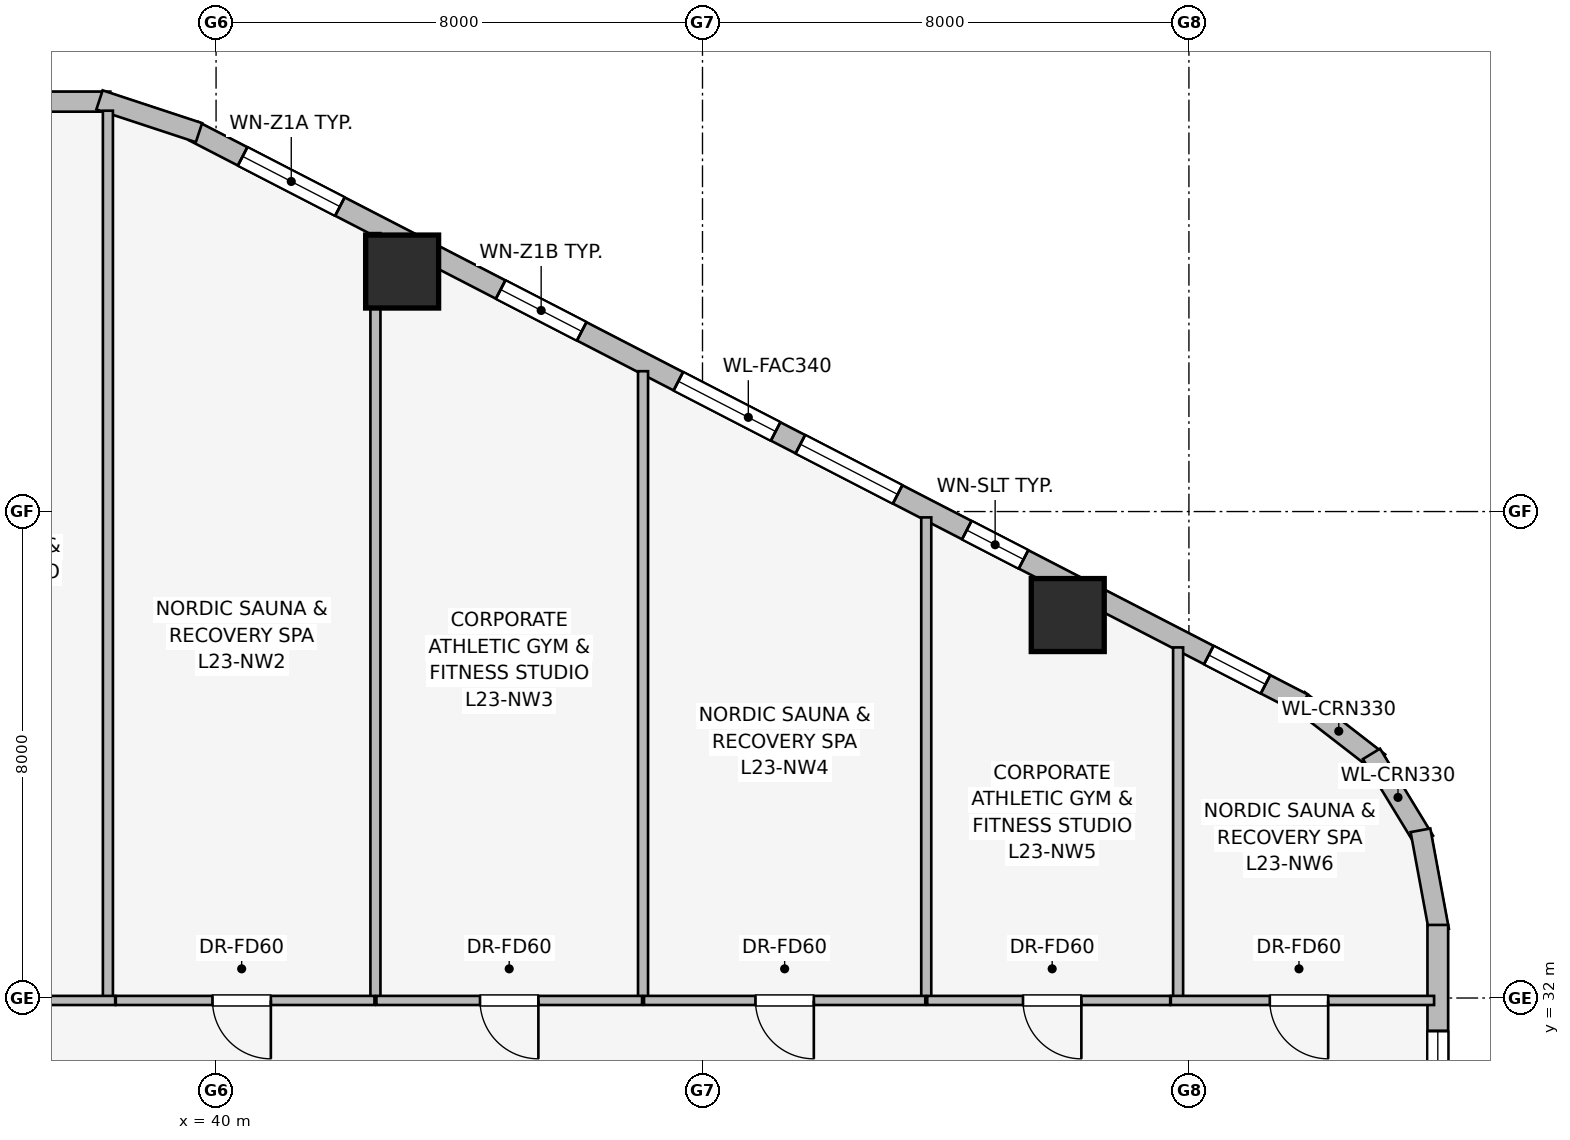
"""IFC4 building model, lengths in metres.
Left out: names, types, materials, properties, quantities, classifications, styles, units other than length and angle.
Written with IfcOpenShell. Run it as: python <this file> out.ifc"""

import sys

from ifc_helpers import new_model, si_unit, direction, frame, frame_2d, origin, origin_2d, place, context, subcontext, project, spatial, rectangle, extrude, element, fill, save


model = new_model("IFC4")
c1 = context("Model", 3, precision=1e-05, world=origin(), true_north=direction((0.0, 1.0)))
c2 = subcontext(c1, "Body", "Model", "MODEL_VIEW")
j1 = project(units=[si_unit("LENGTHUNIT", "METRE"), si_unit("PLANEANGLEUNIT", "RADIAN")], contexts=[c1])
p1 = place(None, origin())
s1 = spatial("IfcSite", under=j1, at=p1, CompositionType="ELEMENT")
p2 = place(p1, origin())
s2 = spatial("IfcBuilding", under=s1, at=p2, CompositionType="ELEMENT")
p3 = place(p2, frame((0.0, 0.0, 89.05)))
s3 = spatial("IfcBuildingStorey", under=s2, at=p3, CompositionType="ELEMENT", Elevation=89.05)
for number, where, z_axis, x_axis in (
    (1, (54.007, 38.298, 0.0), (0.0, 0.0, 1.0), (1.0, 0.0, 0.0)),
    (2, (43.06, 43.947, 0.0), (0.0, 0.0, 1.0), (1.0, 0.0, 0.0)),
):
    element("IfcColumn", number, at=place(p3, frame(where, z_axis=z_axis, x_axis=x_axis)), inside=s3, PredefinedType="COLUMN", context=c2, shape_type="SweptSolid", body=[
        extrude(rectangle(XDim=1.2, YDim=1.2, at=origin_2d()), origin(), (0.0, 0.0, 1.0), 3.65),
    ])
p4 = place(p3, frame((57.802, 36.901, 0.0), z_axis=(0.0, 0.0, 1.0), x_axis=(0.790691856293, -0.61221433207, 0.0)))
e3 = element("IfcWall", 3, at=p4, inside=s3, PredefinedType="STANDARD", context=c2, shape_type="SweptSolid", body=[
    extrude(rectangle(XDim=1.676, YDim=0.33, at=frame_2d((0.838, 0.0))), origin(), (0.0, 0.0, 1.0), 3.39),
])
p5 = place(p3, frame((59.002, 36.015, 0.0), z_axis=(0.0, 0.0, 1.0), x_axis=(0.520584129191, -0.853810379671, 0.0)))
e4 = element("IfcWall", 4, at=p5, inside=s3, PredefinedType="STANDARD", context=c2, shape_type="SweptSolid", body=[
    extrude(rectangle(XDim=1.677, YDim=0.33, at=frame_2d((0.838, 0.0))), origin(), (0.0, 0.0, 1.0), 3.39),
])
p6 = place(p3, frame((59.808, 34.758, 0.0), z_axis=(0.0, 0.0, 1.0), x_axis=(0.181714143354, -0.983351397063, 0.0)))
e5 = element("IfcWall", 5, at=p6, inside=s3, PredefinedType="STANDARD", context=c2, shape_type="SweptSolid", body=[
    extrude(rectangle(XDim=1.678, YDim=0.33, at=frame_2d((0.839, 0.0))), origin(), (0.0, 0.0, 1.0), 3.39),
])
p7 = place(p3, frame((39.631, 46.257, 0.0), z_axis=(0.0, 0.0, 1.0), x_axis=(0.888634413993, -0.458616264721, 0.0)))
e6 = element("IfcWall", 6, at=p7, inside=s3, PredefinedType="STANDARD", context=c2, shape_type="SweptSolid", body=[
    extrude(rectangle(XDim=20.531, YDim=0.34, at=frame_2d((10.266, 0.0))), origin(), (0.0, 0.0, 1.0), 2.684),
])
p8 = place(p7, frame((0.907, 0.0, 0.75)))
e7 = element("IfcOpeningElement", 7, at=p8, cuts=e6, PredefinedType="OPENING", context=c2, shape_type="SweptSolid", body=[
    extrude(rectangle(XDim=1.8, YDim=1.5, at=frame_2d((0.9, 0.75))), frame((0.0, 0.18, 0.0), z_axis=(0.0, -1.0, 0.0), x_axis=(1.0, 0.0, 0.0)), (0.0, 0.0, 1.0), 0.36),
])
p9 = place(p7, frame((5.682, 0.0, 0.75)))
e8 = element("IfcOpeningElement", 8, at=p9, cuts=e6, PredefinedType="OPENING", context=c2, shape_type="SweptSolid", body=[
    extrude(rectangle(XDim=1.5, YDim=1.5, at=frame_2d((0.75, 0.75))), frame((0.0, 0.18, 0.0), z_axis=(0.0, -1.0, 0.0), x_axis=(1.0, 0.0, 0.0)), (0.0, 0.0, 1.0), 0.36),
])
p10 = place(p7, frame((8.971, 0.0, 0.75)))
e9 = element("IfcOpeningElement", 9, at=p10, cuts=e6, PredefinedType="OPENING", context=c2, shape_type="SweptSolid", body=[
    extrude(rectangle(XDim=1.8, YDim=1.5, at=frame_2d((0.9, 0.75))), frame((0.0, 0.18, 0.0), z_axis=(0.0, -1.0, 0.0), x_axis=(1.0, 0.0, 0.0)), (0.0, 0.0, 1.0), 0.36),
])
p11 = place(p7, frame((11.229, 0.0, 0.75)))
e10 = element("IfcOpeningElement", 10, at=p11, cuts=e6, PredefinedType="OPENING", context=c2, shape_type="SweptSolid", body=[
    extrude(rectangle(XDim=1.8, YDim=1.5, at=frame_2d((0.9, 0.75))), frame((0.0, 0.18, 0.0), z_axis=(0.0, -1.0, 0.0), x_axis=(1.0, 0.0, 0.0)), (0.0, 0.0, 1.0), 0.36),
])
p12 = place(p7, frame((14.309, 0.0, 0.75)))
e11 = element("IfcOpeningElement", 11, at=p12, cuts=e6, PredefinedType="OPENING", context=c2, shape_type="SweptSolid", body=[
    extrude(rectangle(XDim=1.05, YDim=1.4, at=frame_2d((0.525, 0.7))), frame((0.0, 0.18, 0.0), z_axis=(0.0, -1.0, 0.0), x_axis=(1.0, 0.0, 0.0)), (0.0, 0.0, 1.0), 0.36),
])
p13 = place(p7, frame((18.788, 0.0, 0.75)))
e12 = element("IfcOpeningElement", 12, at=p13, cuts=e6, PredefinedType="OPENING", context=c2, shape_type="SweptSolid", body=[
    extrude(rectangle(XDim=1.05, YDim=1.4, at=frame_2d((0.525, 0.7))), frame((0.0, 0.18, 0.0), z_axis=(0.0, -1.0, 0.0), x_axis=(1.0, 0.0, 0.0)), (0.0, 0.0, 1.0), 0.36),
])
p14 = place(p3, frame((36.539, 46.741, 0.0), z_axis=(0.0, 0.0, 1.0), x_axis=(1.0, 0.0, 0.0)))
e13 = element("IfcWall", 13, at=p14, inside=s3, PredefinedType="STANDARD", context=c2, shape_type="SweptSolid", body=[
    extrude(rectangle(XDim=1.722, YDim=0.33, at=frame_2d((0.861, 0.0))), origin(), (0.0, 0.0, 1.0), 3.39),
])
p15 = place(p3, frame((38.083, 46.77, 0.0), z_axis=(0.0, 0.0, 1.0), x_axis=(0.94976901097, -0.312951794691, 0.0)))
e14 = element("IfcWall", 14, at=p15, inside=s3, PredefinedType="STANDARD", context=c2, shape_type="SweptSolid", body=[
    extrude(rectangle(XDim=1.722, YDim=0.33, at=frame_2d((0.861, 0.0))), origin(), (0.0, 0.0, 1.0), 3.39),
])
p16 = place(p3, frame((60.093, 33.202, 0.0), z_axis=(0.0, 0.0, 1.0), x_axis=(0.0, -1.0, 0.0)))
e15 = element("IfcWall", 15, at=p16, inside=s3, PredefinedType="STANDARD", context=c2, shape_type="SweptSolid", body=[
    extrude(rectangle(XDim=18.404, YDim=0.34, at=frame_2d((9.202, 0.0))), origin(), (0.0, 0.0, 1.0), 2.684),
])
p17 = place(p16, frame((1.744, 0.0, 0.75)))
e16 = element("IfcOpeningElement", 16, at=p17, cuts=e15, PredefinedType="OPENING", context=c2, shape_type="SweptSolid", body=[
    extrude(rectangle(XDim=1.05, YDim=1.4, at=frame_2d((0.525, 0.7))), frame((0.0, 0.18, 0.0), z_axis=(0.0, -1.0, 0.0), x_axis=(1.0, 0.0, 0.0)), (0.0, 0.0, 1.0), 0.36),
])
p18 = place(p16, frame((5.265, 0.0, 0.75)))
e17 = element("IfcOpeningElement", 17, at=p18, cuts=e15, PredefinedType="OPENING", context=c2, shape_type="SweptSolid", body=[
    extrude(rectangle(XDim=1.5, YDim=1.5, at=frame_2d((0.75, 0.75))), frame((0.0, 0.18, 0.0), z_axis=(0.0, -1.0, 0.0), x_axis=(1.0, 0.0, 0.0)), (0.0, 0.0, 1.0), 0.36),
])
p19 = place(p16, frame((8.452, 0.0, 0.75)))
e18 = element("IfcOpeningElement", 18, at=p19, cuts=e15, PredefinedType="OPENING", context=c2, shape_type="SweptSolid", body=[
    extrude(rectangle(XDim=1.5, YDim=1.5, at=frame_2d((0.75, 0.75))), frame((0.0, 0.18, 0.0), z_axis=(0.0, -1.0, 0.0), x_axis=(1.0, 0.0, 0.0)), (0.0, 0.0, 1.0), 0.36),
])
p20 = place(p16, frame((11.639, 0.0, 0.75)))
e19 = element("IfcOpeningElement", 19, at=p20, cuts=e15, PredefinedType="OPENING", context=c2, shape_type="SweptSolid", body=[
    extrude(rectangle(XDim=1.5, YDim=1.5, at=frame_2d((0.75, 0.75))), frame((0.0, 0.18, 0.0), z_axis=(0.0, -1.0, 0.0), x_axis=(1.0, 0.0, 0.0)), (0.0, 0.0, 1.0), 0.36),
])
p21 = place(p16, frame((15.65, 0.0, 0.75)))
e20 = element("IfcOpeningElement", 20, at=p21, cuts=e15, PredefinedType="OPENING", context=c2, shape_type="SweptSolid", body=[
    extrude(rectangle(XDim=1.05, YDim=1.4, at=frame_2d((0.525, 0.7))), frame((0.0, 0.18, 0.0), z_axis=(0.0, -1.0, 0.0), x_axis=(1.0, 0.0, 0.0)), (0.0, 0.0, 1.0), 0.36),
])
p22 = place(p3, frame((38.221, 31.97, 0.0), z_axis=(0.0, 0.0, 1.0), x_axis=(0.0, 1.0, 0.0)))
e21 = element("IfcWall", 21, at=p22, inside=s3, PredefinedType="PARTITIONING", context=c2, shape_type="SweptSolid", body=[
    extrude(rectangle(XDim=14.622, YDim=0.165, at=frame_2d((7.311, 0.0))), origin(), (0.0, 0.0, 1.0), 3.39),
])
p23 = place(p3, frame((42.621, 31.97, 0.0), z_axis=(0.0, 0.0, 1.0), x_axis=(0.0, 1.0, 0.0)))
e22 = element("IfcWall", 22, at=p23, inside=s3, PredefinedType="PARTITIONING", context=c2, shape_type="SweptSolid", body=[
    extrude(rectangle(XDim=12.609, YDim=0.165, at=frame_2d((6.305, 0.0))), origin(), (0.0, 0.0, 1.0), 2.513),
])
p24 = place(p3, frame((47.022, 31.97, 0.0), z_axis=(0.0, 0.0, 1.0), x_axis=(0.0, 1.0, 0.0)))
e23 = element("IfcWall", 23, at=p24, inside=s3, PredefinedType="PARTITIONING", context=c2, shape_type="SweptSolid", body=[
    extrude(rectangle(XDim=10.338, YDim=0.165, at=frame_2d((5.169, 0.0))), origin(), (0.0, 0.0, 1.0), 3.39),
])
p25 = place(p3, frame((51.68, 31.97, 0.0), z_axis=(0.0, 0.0, 1.0), x_axis=(0.0, 1.0, 0.0)))
e24 = element("IfcWall", 24, at=p25, inside=s3, PredefinedType="PARTITIONING", context=c2, shape_type="SweptSolid", body=[
    extrude(rectangle(XDim=7.934, YDim=0.165, at=frame_2d((3.967, 0.0))), origin(), (0.0, 0.0, 1.0), 3.39),
])
p26 = place(p3, frame((55.822, 31.97, 0.0), z_axis=(0.0, 0.0, 1.0), x_axis=(0.0, 1.0, 0.0)))
e25 = element("IfcWall", 25, at=p26, inside=s3, PredefinedType="PARTITIONING", context=c2, shape_type="SweptSolid", body=[
    extrude(rectangle(XDim=5.796, YDim=0.165, at=frame_2d((2.898, 0.0))), origin(), (0.0, 0.0, 1.0), 3.39),
])
p27 = place(p3, frame((38.341, 31.96, 0.0), z_axis=(0.0, 0.0, 1.0), x_axis=(-1.0, 0.0, 0.0)))
e26 = element("IfcWall", 26, at=p27, inside=s3, PredefinedType="PARTITIONING", context=c2, shape_type="SweptSolid", body=[
    extrude(rectangle(XDim=4.051, YDim=0.15, at=frame_2d((2.025, 0.0))), origin(), (0.0, 0.0, 1.0), 3.39),
])
p28 = place(p27, frame((1.489, 0.0, 0.0)))
e27 = element("IfcOpeningElement", 27, at=p28, cuts=e26, PredefinedType="OPENING", context=c2, shape_type="SweptSolid", body=[
    extrude(rectangle(XDim=0.96, YDim=2.0, at=frame_2d((0.48, 1.0))), frame((0.0, 0.085, 0.0), z_axis=(0.0, -1.0, 0.0), x_axis=(1.0, 0.0, 0.0)), (0.0, 0.0, 1.0), 0.17),
])
p29 = place(p3, frame((42.605, 31.96, 0.0), z_axis=(0.0, 0.0, 1.0), x_axis=(-1.0, 0.0, 0.0)))
e28 = element("IfcWall", 28, at=p29, inside=s3, PredefinedType="PARTITIONING", context=c2, shape_type="SweptSolid", body=[
    extrude(rectangle(XDim=4.254, YDim=0.15, at=frame_2d((2.127, 0.0))), origin(), (0.0, 0.0, 1.0), 3.39),
])
p30 = place(p29, frame((1.704, 0.0, 0.0)))
e29 = element("IfcOpeningElement", 29, at=p30, cuts=e28, PredefinedType="OPENING", context=c2, shape_type="SweptSolid", body=[
    extrude(rectangle(XDim=0.96, YDim=2.0, at=frame_2d((0.48, 1.0))), frame((0.0, 0.085, 0.0), z_axis=(0.0, -1.0, 0.0), x_axis=(1.0, 0.0, 0.0)), (0.0, 0.0, 1.0), 0.17),
])
p31 = place(p3, frame((47.006, 31.96, 0.0), z_axis=(0.0, 0.0, 1.0), x_axis=(-1.0, 0.0, 0.0)))
e30 = element("IfcWall", 30, at=p31, inside=s3, PredefinedType="PARTITIONING", context=c2, shape_type="SweptSolid", body=[
    extrude(rectangle(XDim=4.369, YDim=0.15, at=frame_2d((2.185, 0.0))), origin(), (0.0, 0.0, 1.0), 3.39),
])
p32 = place(p31, frame((1.705, 0.0, 0.0)))
e31 = element("IfcOpeningElement", 31, at=p32, cuts=e30, PredefinedType="OPENING", context=c2, shape_type="SweptSolid", body=[
    extrude(rectangle(XDim=0.96, YDim=2.0, at=frame_2d((0.48, 1.0))), frame((0.0, 0.085, 0.0), z_axis=(0.0, -1.0, 0.0), x_axis=(1.0, 0.0, 0.0)), (0.0, 0.0, 1.0), 0.17),
])
p33 = place(p3, frame((51.664, 31.96, 0.0), z_axis=(0.0, 0.0, 1.0), x_axis=(-1.0, 0.0, 0.0)))
e32 = element("IfcWall", 32, at=p33, inside=s3, PredefinedType="PARTITIONING", context=c2, shape_type="SweptSolid", body=[
    extrude(rectangle(XDim=4.626, YDim=0.15, at=frame_2d((2.313, 0.0))), origin(), (0.0, 0.0, 1.0), 3.39),
])
p34 = place(p33, frame((1.833, 0.0, 0.0)))
e33 = element("IfcOpeningElement", 33, at=p34, cuts=e32, PredefinedType="OPENING", context=c2, shape_type="SweptSolid", body=[
    extrude(rectangle(XDim=0.96, YDim=2.0, at=frame_2d((0.48, 1.0))), frame((0.0, 0.085, 0.0), z_axis=(0.0, -1.0, 0.0), x_axis=(1.0, 0.0, 0.0)), (0.0, 0.0, 1.0), 0.17),
])
p35 = place(p3, frame((55.692, 31.96, 0.0), z_axis=(0.0, 0.0, 1.0), x_axis=(-1.0, 0.0, 0.0)))
e34 = element("IfcWall", 34, at=p35, inside=s3, PredefinedType="PARTITIONING", context=c2, shape_type="SweptSolid", body=[
    extrude(rectangle(XDim=3.996, YDim=0.15, at=frame_2d((1.998, 0.0))), origin(), (0.0, 0.0, 1.0), 3.39),
])
p36 = place(p35, frame((1.461, 0.0, 0.0)))
e35 = element("IfcOpeningElement", 35, at=p36, cuts=e34, PredefinedType="OPENING", context=c2, shape_type="SweptSolid", body=[
    extrude(rectangle(XDim=0.96, YDim=2.0, at=frame_2d((0.48, 1.0))), frame((0.0, 0.085, 0.0), z_axis=(0.0, -1.0, 0.0), x_axis=(1.0, 0.0, 0.0)), (0.0, 0.0, 1.0), 0.17),
])
p37 = place(p3, frame((60.032, 31.96, 0.0), z_axis=(0.0, 0.0, 1.0), x_axis=(-1.0, 0.0, 0.0)))
e36 = element("IfcWall", 36, at=p37, inside=s3, PredefinedType="PARTITIONING", context=c2, shape_type="SweptSolid", body=[
    extrude(rectangle(XDim=4.33, YDim=0.15, at=frame_2d((2.165, 0.0))), origin(), (0.0, 0.0, 1.0), 3.39),
])
p38 = place(p37, frame((1.742, 0.0, 0.0)))
e37 = element("IfcOpeningElement", 37, at=p38, cuts=e36, PredefinedType="OPENING", context=c2, shape_type="SweptSolid", body=[
    extrude(rectangle(XDim=0.96, YDim=2.0, at=frame_2d((0.48, 1.0))), frame((0.0, 0.085, 0.0), z_axis=(0.0, -1.0, 0.0), x_axis=(1.0, 0.0, 0.0)), (0.0, 0.0, 1.0), 0.17),
])
p39 = place(p8, origin())
e38 = element("IfcWindow", 38, at=p39, inside=s3, PartitioningType="SINGLE_PANEL", PredefinedType="WINDOW", context=c2, shape_type="SweptSolid", body=[
    extrude(rectangle(XDim=1.8, YDim=1.5, at=frame_2d((0.9, 0.75))), frame((0.0, 0.03, 0.0), z_axis=(0.0, -1.0, 0.0), x_axis=(1.0, 0.0, 0.0)), (0.0, 0.0, 1.0), 0.06),
])
fill(e7, e38)
p40 = place(p9, origin())
e39 = element("IfcWindow", 39, at=p40, inside=s3, PartitioningType="SINGLE_PANEL", PredefinedType="WINDOW", context=c2, shape_type="SweptSolid", body=[
    extrude(rectangle(XDim=1.5, YDim=1.5, at=frame_2d((0.75, 0.75))), frame((0.0, 0.03, 0.0), z_axis=(0.0, -1.0, 0.0), x_axis=(1.0, 0.0, 0.0)), (0.0, 0.0, 1.0), 0.06),
])
fill(e8, e39)
p41 = place(p10, origin())
e40 = element("IfcWindow", 40, at=p41, inside=s3, PartitioningType="SINGLE_PANEL", PredefinedType="WINDOW", context=c2, shape_type="SweptSolid", body=[
    extrude(rectangle(XDim=1.8, YDim=1.5, at=frame_2d((0.9, 0.75))), frame((0.0, 0.03, 0.0), z_axis=(0.0, -1.0, 0.0), x_axis=(1.0, 0.0, 0.0)), (0.0, 0.0, 1.0), 0.06),
])
fill(e9, e40)
p42 = place(p11, origin())
e41 = element("IfcWindow", 41, at=p42, inside=s3, PartitioningType="SINGLE_PANEL", PredefinedType="WINDOW", context=c2, shape_type="SweptSolid", body=[
    extrude(rectangle(XDim=1.8, YDim=1.5, at=frame_2d((0.9, 0.75))), frame((0.0, 0.03, 0.0), z_axis=(0.0, -1.0, 0.0), x_axis=(1.0, 0.0, 0.0)), (0.0, 0.0, 1.0), 0.06),
])
fill(e10, e41)
p43 = place(p12, origin())
e42 = element("IfcWindow", 42, at=p43, inside=s3, PartitioningType="SINGLE_PANEL", PredefinedType="WINDOW", context=c2, shape_type="SweptSolid", body=[
    extrude(rectangle(XDim=1.05, YDim=1.4, at=frame_2d((0.525, 0.7))), frame((0.0, 0.03, 0.0), z_axis=(0.0, -1.0, 0.0), x_axis=(1.0, 0.0, 0.0)), (0.0, 0.0, 1.0), 0.06),
])
fill(e11, e42)
p44 = place(p13, origin())
e43 = element("IfcWindow", 43, at=p44, inside=s3, PartitioningType="SINGLE_PANEL", PredefinedType="WINDOW", context=c2, shape_type="SweptSolid", body=[
    extrude(rectangle(XDim=1.05, YDim=1.4, at=frame_2d((0.525, 0.7))), frame((0.0, 0.03, 0.0), z_axis=(0.0, -1.0, 0.0), x_axis=(1.0, 0.0, 0.0)), (0.0, 0.0, 1.0), 0.06),
])
fill(e12, e43)
p45 = place(p17, origin())
e44 = element("IfcWindow", 44, at=p45, inside=s3, PartitioningType="SINGLE_PANEL", PredefinedType="WINDOW", context=c2, shape_type="SweptSolid", body=[
    extrude(rectangle(XDim=1.05, YDim=1.4, at=frame_2d((0.525, 0.7))), frame((0.0, 0.03, 0.0), z_axis=(0.0, -1.0, 0.0), x_axis=(1.0, 0.0, 0.0)), (0.0, 0.0, 1.0), 0.06),
])
fill(e16, e44)
p46 = place(p30, origin())
e45 = element("IfcDoor", 45, at=p46, inside=s3, OperationType="SINGLE_SWING_LEFT", PredefinedType="DOOR", context=c2, shape_type="SweptSolid", body=[
    extrude(rectangle(XDim=0.96, YDim=2.0, at=frame_2d((0.48, 1.0))), frame((0.0, 0.025, 0.0), z_axis=(0.0, -1.0, 0.0), x_axis=(1.0, 0.0, 0.0)), (0.0, 0.0, 1.0), 0.05),
])
fill(e29, e45)
p47 = place(p32, origin())
e46 = element("IfcDoor", 46, at=p47, inside=s3, OperationType="SINGLE_SWING_LEFT", PredefinedType="DOOR", context=c2, shape_type="SweptSolid", body=[
    extrude(rectangle(XDim=0.96, YDim=2.0, at=frame_2d((0.48, 1.0))), frame((0.0, 0.025, 0.0), z_axis=(0.0, -1.0, 0.0), x_axis=(1.0, 0.0, 0.0)), (0.0, 0.0, 1.0), 0.05),
])
fill(e31, e46)
p48 = place(p34, origin())
e47 = element("IfcDoor", 47, at=p48, inside=s3, OperationType="SINGLE_SWING_LEFT", PredefinedType="DOOR", context=c2, shape_type="SweptSolid", body=[
    extrude(rectangle(XDim=0.96, YDim=2.0, at=frame_2d((0.48, 1.0))), frame((0.0, 0.025, 0.0), z_axis=(0.0, -1.0, 0.0), x_axis=(1.0, 0.0, 0.0)), (0.0, 0.0, 1.0), 0.05),
])
fill(e33, e47)
p49 = place(p36, origin())
e48 = element("IfcDoor", 48, at=p49, inside=s3, OperationType="SINGLE_SWING_LEFT", PredefinedType="DOOR", context=c2, shape_type="SweptSolid", body=[
    extrude(rectangle(XDim=0.96, YDim=2.0, at=frame_2d((0.48, 1.0))), frame((0.0, 0.025, 0.0), z_axis=(0.0, -1.0, 0.0), x_axis=(1.0, 0.0, 0.0)), (0.0, 0.0, 1.0), 0.05),
])
fill(e35, e48)
p50 = place(p38, origin())
e49 = element("IfcDoor", 49, at=p50, inside=s3, OperationType="SINGLE_SWING_LEFT", PredefinedType="DOOR", context=c2, shape_type="SweptSolid", body=[
    extrude(rectangle(XDim=0.96, YDim=2.0, at=frame_2d((0.48, 1.0))), frame((0.0, 0.025, 0.0), z_axis=(0.0, -1.0, 0.0), x_axis=(1.0, 0.0, 0.0)), (0.0, 0.0, 1.0), 0.05),
])
fill(e37, e49)
save(model, sys.argv[1])
